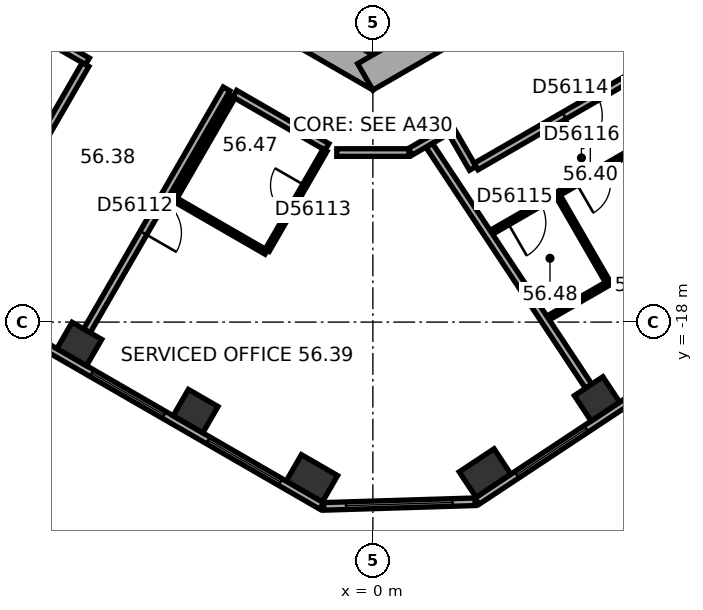
"""IFC4 building model, lengths in metres.
Left out: names, types, materials, properties, quantities, classifications, styles, units other than length and angle.
Written with IfcOpenShell. Run it as: python <this file> out.ifc"""

import sys

from ifc_helpers import new_model, si_unit, direction, frame, frame_2d, origin, origin_2d, place, context, subcontext, project, spatial, rectangle, extrude, element, fill, save


model = new_model("IFC4")
c1 = context("Model", 3, precision=1e-05, world=origin(), true_north=direction((0.0, 1.0)))
c2 = subcontext(c1, "Body", "Model", "MODEL_VIEW")
j1 = project(units=[si_unit("LENGTHUNIT", "METRE"), si_unit("PLANEANGLEUNIT", "RADIAN")], contexts=[c1])
p1 = place(None, origin())
s1 = spatial("IfcSite", under=j1, at=p1, CompositionType="ELEMENT")
p2 = place(p1, origin())
s2 = spatial("IfcBuilding", under=s1, at=p2, CompositionType="ELEMENT")
p3 = place(p2, frame((0.0, 0.0, 229.1)))
s3 = spatial("IfcBuildingStorey", under=s2, at=p3, CompositionType="ELEMENT", Elevation=229.1)
for number, where, z_axis, x_axis in (
    (1, (-7.725, -18.576, 0.0), (0.0, 0.0, 1.0), (0.866, -0.5, 0.0)),
    (2, (-4.665, -20.343, 0.0), (0.0, 0.0, 1.0), (0.866, -0.5, 0.0)),
):
    element("IfcColumn", number, at=place(p3, frame(where, z_axis=z_axis, x_axis=x_axis)), inside=s3, PredefinedType="COLUMN", context=c2, shape_type="SweptSolid", body=[
        extrude(rectangle(XDim=0.9, YDim=0.8, at=origin_2d()), origin(), (0.0, 0.0, 1.0), 3.7),
    ])
for number, where, z_axis, x_axis in (
    (3, (-1.604, -22.11, 0.0), (0.0, 0.0, 1.0), (0.866, -0.5, 0.0)),
    (4, (2.951, -21.971, 0.0), (0.0, 0.0, 1.0), (0.834, 0.552, 0.0)),
):
    element("IfcColumn", number, at=place(p3, frame(where, z_axis=z_axis, x_axis=x_axis)), inside=s3, PredefinedType="COLUMN", context=c2, shape_type="SweptSolid", body=[
        extrude(rectangle(XDim=1.1, YDim=0.8, at=origin_2d()), origin(), (0.0, 0.0, 1.0), 3.7),
    ])
p4 = place(p3, frame((5.898, -20.021, 0.0), z_axis=(0.0, 0.0, 1.0), x_axis=(0.833885822067, 0.551936985312, 0.0)))
e5 = element("IfcColumn", 5, at=p4, inside=s3, PredefinedType="COLUMN", context=c2, shape_type="SweptSolid", body=[
    extrude(rectangle(XDim=0.9, YDim=0.8, at=origin_2d()), origin(), (0.0, 0.0, 1.0), 3.7),
])
p5 = place(p3, frame((-10.1, -5.6, 0.0), z_axis=(0.0, 0.0, 1.0), x_axis=(0.866023897231, -0.500002609418, 0.0)))
e6 = element("IfcWall", 6, at=p5, inside=s3, PredefinedType="SHEAR", context=c2, shape_type="SweptSolid", body=[
    extrude(rectangle(XDim=11.894, YDim=0.8, at=frame_2d((5.947, 0.0))), origin(), (0.0, 0.0, 1.0), 3.7),
])
p6 = place(p5, frame((6.147, 0.0, 0.0)))
e7 = element("IfcOpeningElement", 7, at=p6, cuts=e6, PredefinedType="OPENING", context=c2, shape_type="SweptSolid", body=[
    extrude(rectangle(XDim=1.5, YDim=2.1, at=frame_2d((0.75, 1.05))), frame((0.0, 0.41, 0.0), z_axis=(0.0, -1.0, 0.0), x_axis=(1.0, 0.0, 0.0)), (0.0, 0.0, 1.0), 0.82),
])
p7 = place(p5, frame((1.597, 0.0, 0.0)))
e8 = element("IfcOpeningElement", 8, at=p7, cuts=e6, PredefinedType="OPENING", context=c2, shape_type="SweptSolid", body=[
    extrude(rectangle(XDim=1.1, YDim=2.1, at=frame_2d((0.55, 1.05))), frame((0.0, 0.41, 0.0), z_axis=(0.0, -1.0, 0.0), x_axis=(1.0, 0.0, 0.0)), (0.0, 0.0, 1.0), 0.82),
])
p8 = place(p5, frame((4.197, 0.0, 0.0)))
e9 = element("IfcOpeningElement", 9, at=p8, cuts=e6, PredefinedType="OPENING", context=c2, shape_type="SweptSolid", body=[
    extrude(rectangle(XDim=1.1, YDim=2.1, at=frame_2d((0.55, 1.05))), frame((0.0, 0.41, 0.0), z_axis=(0.0, -1.0, 0.0), x_axis=(1.0, 0.0, 0.0)), (0.0, 0.0, 1.0), 0.82),
])
p9 = place(p3, frame((-0.2, -11.547, 0.0), z_axis=(0.0, 0.0, 1.0), x_axis=(0.866023897231, 0.500002609418, 0.0)))
e10 = element("IfcWall", 10, at=p9, inside=s3, PredefinedType="SHEAR", context=c2, shape_type="SweptSolid", body=[
    extrude(rectangle(XDim=11.894, YDim=0.8, at=frame_2d((5.947, 0.0))), origin(), (0.0, 0.0, 1.0), 3.7),
])
p10 = place(p9, frame((2.497, 0.0, 0.0)))
e11 = element("IfcOpeningElement", 11, at=p10, cuts=e10, PredefinedType="OPENING", context=c2, shape_type="SweptSolid", body=[
    extrude(rectangle(XDim=1.1, YDim=2.1, at=frame_2d((0.55, 1.05))), frame((0.0, 0.41, 0.0), z_axis=(0.0, -1.0, 0.0), x_axis=(1.0, 0.0, 0.0)), (0.0, 0.0, 1.0), 0.82),
])
p11 = place(p9, frame((5.097, 0.0, 0.0)))
e12 = element("IfcOpeningElement", 12, at=p11, cuts=e10, PredefinedType="OPENING", context=c2, shape_type="SweptSolid", body=[
    extrude(rectangle(XDim=1.1, YDim=2.1, at=frame_2d((0.55, 1.05))), frame((0.0, 0.41, 0.0), z_axis=(0.0, -1.0, 0.0), x_axis=(1.0, 0.0, 0.0)), (0.0, 0.0, 1.0), 0.82),
])
p12 = place(p9, frame((7.697, 0.0, 0.0)))
e13 = element("IfcOpeningElement", 13, at=p12, cuts=e10, PredefinedType="OPENING", context=c2, shape_type="SweptSolid", body=[
    extrude(rectangle(XDim=1.1, YDim=2.1, at=frame_2d((0.55, 1.05))), frame((0.0, 0.41, 0.0), z_axis=(0.0, -1.0, 0.0), x_axis=(1.0, 0.0, 0.0)), (0.0, 0.0, 1.0), 0.82),
])
p13 = place(p3, frame((-17.664, -13.415, 0.0), z_axis=(0.0, 0.0, 1.0), x_axis=(0.866026555358, -0.49999800541, 0.0)))
e14 = element("IfcWall", 14, at=p13, inside=s3, PredefinedType="STANDARD", context=c2, shape_type="SweptSolid", body=[
    extrude(rectangle(XDim=18.841, YDim=0.2, at=frame_2d((9.421, 0.0))), origin(), (0.0, 0.0, 1.0), 3.7),
])
p14 = place(p13, frame((1.254, 0.0, 0.9)))
e15 = element("IfcOpeningElement", 15, at=p14, cuts=e14, PredefinedType="OPENING", context=c2, shape_type="SweptSolid", body=[
    extrude(rectangle(XDim=2.2, YDim=2.0, at=frame_2d((1.1, 1.0))), frame((0.0, 0.11, 0.0), z_axis=(0.0, -1.0, 0.0), x_axis=(1.0, 0.0, 0.0)), (0.0, 0.0, 1.0), 0.22),
])
p15 = place(p13, frame((4.788, 0.0, 0.9)))
e16 = element("IfcOpeningElement", 16, at=p15, cuts=e14, PredefinedType="OPENING", context=c2, shape_type="SweptSolid", body=[
    extrude(rectangle(XDim=2.2, YDim=2.0, at=frame_2d((1.1, 1.0))), frame((0.0, 0.11, 0.0), z_axis=(0.0, -1.0, 0.0), x_axis=(1.0, 0.0, 0.0)), (0.0, 0.0, 1.0), 0.22),
])
p16 = place(p13, frame((8.322, 0.0, 0.9)))
e17 = element("IfcOpeningElement", 17, at=p16, cuts=e14, PredefinedType="OPENING", context=c2, shape_type="SweptSolid", body=[
    extrude(rectangle(XDim=2.2, YDim=2.0, at=frame_2d((1.1, 1.0))), frame((0.0, 0.11, 0.0), z_axis=(0.0, -1.0, 0.0), x_axis=(1.0, 0.0, 0.0)), (0.0, 0.0, 1.0), 0.22),
])
p17 = place(p13, frame((11.855, 0.0, 0.9)))
e18 = element("IfcOpeningElement", 18, at=p17, cuts=e14, PredefinedType="OPENING", context=c2, shape_type="SweptSolid", body=[
    extrude(rectangle(XDim=2.2, YDim=2.0, at=frame_2d((1.1, 1.0))), frame((0.0, 0.11, 0.0), z_axis=(0.0, -1.0, 0.0), x_axis=(1.0, 0.0, 0.0)), (0.0, 0.0, 1.0), 0.22),
])
p18 = place(p13, frame((15.389, 0.0, 0.9)))
e19 = element("IfcOpeningElement", 19, at=p18, cuts=e14, PredefinedType="OPENING", context=c2, shape_type="SweptSolid", body=[
    extrude(rectangle(XDim=2.2, YDim=2.0, at=frame_2d((1.1, 1.0))), frame((0.0, 0.11, 0.0), z_axis=(0.0, -1.0, 0.0), x_axis=(1.0, 0.0, 0.0)), (0.0, 0.0, 1.0), 0.22),
])
p19 = place(p3, frame((-1.294, -22.849, 0.0), z_axis=(0.0, 0.0, 1.0), x_axis=(0.999533952558, 0.030526671678, 0.0)))
e20 = element("IfcWall", 20, at=p19, inside=s3, PredefinedType="STANDARD", context=c2, shape_type="SweptSolid", body=[
    extrude(rectangle(XDim=3.983, YDim=0.2, at=frame_2d((1.991, 0.0))), origin(), (0.0, 0.0, 1.0), 3.7),
])
p20 = place(p19, frame((0.591, 0.0, 0.9)))
e21 = element("IfcOpeningElement", 21, at=p20, cuts=e20, PredefinedType="OPENING", context=c2, shape_type="SweptSolid", body=[
    extrude(rectangle(XDim=2.8, YDim=2.0, at=frame_2d((1.4, 1.0))), frame((0.0, 0.11, 0.0), z_axis=(0.0, -1.0, 0.0), x_axis=(1.0, 0.0, 0.0)), (0.0, 0.0, 1.0), 0.22),
])
p21 = place(p3, frame((2.739, -22.711, 0.0), z_axis=(0.0, 0.0, 1.0), x_axis=(0.833885723098, 0.551937134838, 0.0)))
e22 = element("IfcWall", 22, at=p21, inside=s3, PredefinedType="STANDARD", context=c2, shape_type="SweptSolid", body=[
    extrude(rectangle(XDim=18.841, YDim=0.2, at=frame_2d((9.421, 0.0))), origin(), (0.0, 0.0, 1.0), 3.7),
])
p22 = place(p21, frame((1.252, 0.0, 0.9)))
e23 = element("IfcOpeningElement", 23, at=p22, cuts=e22, PredefinedType="OPENING", context=c2, shape_type="SweptSolid", body=[
    extrude(rectangle(XDim=2.2, YDim=2.0, at=frame_2d((1.1, 1.0))), frame((0.0, 0.11, 0.0), z_axis=(0.0, -1.0, 0.0), x_axis=(1.0, 0.0, 0.0)), (0.0, 0.0, 1.0), 0.22),
])
p23 = place(p21, frame((4.786, 0.0, 0.9)))
e24 = element("IfcOpeningElement", 24, at=p23, cuts=e22, PredefinedType="OPENING", context=c2, shape_type="SweptSolid", body=[
    extrude(rectangle(XDim=2.2, YDim=2.0, at=frame_2d((1.1, 1.0))), frame((0.0, 0.11, 0.0), z_axis=(0.0, -1.0, 0.0), x_axis=(1.0, 0.0, 0.0)), (0.0, 0.0, 1.0), 0.22),
])
p24 = place(p21, frame((8.32, 0.0, 0.9)))
e25 = element("IfcOpeningElement", 25, at=p24, cuts=e22, PredefinedType="OPENING", context=c2, shape_type="SweptSolid", body=[
    extrude(rectangle(XDim=2.2, YDim=2.0, at=frame_2d((1.1, 1.0))), frame((0.0, 0.11, 0.0), z_axis=(0.0, -1.0, 0.0), x_axis=(1.0, 0.0, 0.0)), (0.0, 0.0, 1.0), 0.22),
])
p25 = place(p21, frame((11.854, 0.0, 0.9)))
e26 = element("IfcOpeningElement", 26, at=p25, cuts=e22, PredefinedType="OPENING", context=c2, shape_type="SweptSolid", body=[
    extrude(rectangle(XDim=2.2, YDim=2.0, at=frame_2d((1.1, 1.0))), frame((0.0, 0.11, 0.0), z_axis=(0.0, -1.0, 0.0), x_axis=(1.0, 0.0, 0.0)), (0.0, 0.0, 1.0), 0.22),
])
p26 = place(p21, frame((15.387, 0.0, 0.9)))
e27 = element("IfcOpeningElement", 27, at=p26, cuts=e22, PredefinedType="OPENING", context=c2, shape_type="SweptSolid", body=[
    extrude(rectangle(XDim=2.2, YDim=2.0, at=frame_2d((1.1, 1.0))), frame((0.0, 0.11, 0.0), z_axis=(0.0, -1.0, 0.0), x_axis=(1.0, 0.0, 0.0)), (0.0, 0.0, 1.0), 0.22),
])
p27 = place(p3, frame((-11.551, -8.805, 0.0), z_axis=(0.0, 0.0, 1.0), x_axis=(0.866038310922, -0.499977643516, 0.0)))
e28 = element("IfcWall", 28, at=p27, inside=s3, PredefinedType="PARTITIONING", context=c2, shape_type="SweptSolid", body=[
    extrude(rectangle(XDim=4.665, YDim=0.2, at=frame_2d((2.333, 0.0))), origin(), (0.0, 0.0, 1.0), 3.42),
])
p28 = place(p3, frame((-10.585, -16.463, 0.0), z_axis=(0.0, 0.0, 1.0), x_axis=(0.499993802756, 0.866028981735, 0.0)))
e29 = element("IfcWall", 29, at=p28, inside=s3, PredefinedType="PARTITIONING", context=c2, shape_type="SweptSolid", body=[
    extrude(rectangle(XDim=6.049, YDim=0.2, at=frame_2d((3.024, 0.0))), origin(), (0.0, 0.0, 1.0), 2.87),
])
p29 = place(p28, frame((2.524, 0.0, 0.0)))
e30 = element("IfcOpeningElement", 30, at=p29, cuts=e29, PredefinedType="OPENING", context=c2, shape_type="SweptSolid", body=[
    extrude(rectangle(XDim=1.0, YDim=2.1, at=frame_2d((0.5, 1.05))), frame((0.0, 0.11, 0.0), z_axis=(0.0, -1.0, 0.0), x_axis=(1.0, 0.0, 0.0)), (0.0, 0.0, 1.0), 0.22),
])
p30 = place(p3, frame((-7.525, -18.23, 0.0), z_axis=(0.0, 0.0, 1.0), x_axis=(0.499983153418, 0.866035129944, 0.0)))
e31 = element("IfcWall", 31, at=p30, inside=s3, PredefinedType="PARTITIONING", context=c2, shape_type="SweptSolid", body=[
    extrude(rectangle(XDim=7.35, YDim=0.2, at=frame_2d((3.675, 0.0))), origin(), (0.0, 0.0, 1.0), 3.42),
])
p31 = place(p30, frame((2.975, 0.0, 0.0)))
e32 = element("IfcOpeningElement", 32, at=p31, cuts=e31, PredefinedType="OPENING", context=c2, shape_type="SweptSolid", body=[
    extrude(rectangle(XDim=1.0, YDim=2.1, at=frame_2d((0.5, 1.05))), frame((0.0, 0.11, 0.0), z_axis=(0.0, -1.0, 0.0), x_axis=(1.0, 0.0, 0.0)), (0.0, 0.0, 1.0), 0.22),
])
p32 = place(p3, frame((-5.233, -14.761, 0.0), z_axis=(0.0, 0.0, 1.0), x_axis=(0.499967891604, 0.866043940782, 0.0)))
e33 = element("IfcWall", 33, at=p32, inside=s3, PredefinedType="PARTITIONING", context=c2, shape_type="SweptSolid", body=[
    extrude(rectangle(XDim=3.1, YDim=0.12, at=frame_2d((1.55, 0.0))), origin(), (0.0, 0.0, 1.0), 3.42),
])
p33 = place(p3, frame((-3.634, -11.99, 0.0), z_axis=(0.0, 0.0, 1.0), x_axis=(0.866018616679, -0.500011755427, 0.0)))
e34 = element("IfcWall", 34, at=p33, inside=s3, PredefinedType="PARTITIONING", context=c2, shape_type="SweptSolid", body=[
    extrude(rectangle(XDim=2.8, YDim=0.2, at=frame_2d((1.4, 0.0))), origin(), (0.0, 0.0, 1.0), 3.42),
])
p34 = place(p3, frame((-2.809, -16.161, 0.0), z_axis=(0.0, 0.0, 1.0), x_axis=(-0.865997131366, 0.500048966069, 0.0)))
e35 = element("IfcWall", 35, at=p34, inside=s3, PredefinedType="PARTITIONING", context=c2, shape_type="SweptSolid", body=[
    extrude(rectangle(XDim=2.74, YDim=0.12, at=frame_2d((1.37, 0.0))), origin(), (0.0, 0.0, 1.0), 3.42),
])
p35 = place(p3, frame((-1.259, -13.476, 0.0), z_axis=(0.0, 0.0, 1.0), x_axis=(-0.500026023896, -0.86601037836, 0.0)))
e36 = element("IfcWall", 36, at=p35, inside=s3, PredefinedType="PARTITIONING", context=c2, shape_type="SweptSolid", body=[
    extrude(rectangle(XDim=3.04, YDim=0.12, at=frame_2d((1.52, 0.0))), origin(), (0.0, 0.0, 1.0), 3.42),
])
p36 = place(p35, frame((1.07, 0.0, 0.0)))
e37 = element("IfcOpeningElement", 37, at=p36, cuts=e36, PredefinedType="OPENING", context=c2, shape_type="SweptSolid", body=[
    extrude(rectangle(XDim=0.9, YDim=2.1, at=frame_2d((0.45, 1.05))), frame((0.0, 0.07, 0.0), z_axis=(0.0, -1.0, 0.0), x_axis=(1.0, 0.0, 0.0)), (0.0, 0.0, 1.0), 0.14),
])
p37 = place(p3, frame((-0.95, -13.539, 0.0), z_axis=(0.0, 0.0, 1.0), x_axis=(1.0, 0.0, 0.0)))
e38 = element("IfcWall", 38, at=p37, inside=s3, PredefinedType="PARTITIONING", context=c2, shape_type="SweptSolid", body=[
    extrude(rectangle(XDim=1.9, YDim=0.2, at=frame_2d((0.95, 0.0))), origin(), (0.0, 0.0, 1.0), 3.42),
])
p38 = place(p3, frame((0.985, -13.519, 0.0), z_axis=(0.0, 0.0, 1.0), x_axis=(0.866054082991, 0.499950322867, 0.0)))
e39 = element("IfcWall", 39, at=p38, inside=s3, PredefinedType="PARTITIONING", context=c2, shape_type="SweptSolid", body=[
    extrude(rectangle(XDim=1.206, YDim=0.2, at=frame_2d((0.603, 0.0))), origin(), (0.0, 0.0, 1.0), 3.42),
])
p39 = place(p3, frame((2.079, -13.003, 0.0), z_axis=(0.0, 0.0, 1.0), x_axis=(0.500074377092, -0.865982457891, 0.0)))
e40 = element("IfcWall", 40, at=p39, inside=s3, PredefinedType="PARTITIONING", context=c2, shape_type="SweptSolid", body=[
    extrude(rectangle(XDim=1.101, YDim=0.2, at=frame_2d((0.55, 0.0))), origin(), (0.0, 0.0, 1.0), 3.42),
])
p40 = place(p3, frame((2.716, -13.906, 0.0), z_axis=(0.0, 0.0, 1.0), x_axis=(0.866040290674, 0.499974214264, 0.0)))
e41 = element("IfcWall", 41, at=p40, inside=s3, PredefinedType="PARTITIONING", context=c2, shape_type="SweptSolid", body=[
    extrude(rectangle(XDim=8.702, YDim=0.2, at=frame_2d((4.351, 0.0))), origin(), (0.0, 0.0, 1.0), 3.42),
])
p41 = place(p40, frame((2.679, 0.0, 0.0)))
e42 = element("IfcOpeningElement", 42, at=p41, cuts=e41, PredefinedType="OPENING", context=c2, shape_type="SweptSolid", body=[
    extrude(rectangle(XDim=1.0, YDim=2.1, at=frame_2d((0.5, 1.05))), frame((0.0, 0.11, 0.0), z_axis=(0.0, -1.0, 0.0), x_axis=(1.0, 0.0, 0.0)), (0.0, 0.0, 1.0), 0.22),
])
p42 = place(p3, frame((3.117, -15.638, 0.0), z_axis=(0.0, 0.0, 1.0), x_axis=(0.866031365477, 0.499989673903, 0.0)))
e43 = element("IfcWall", 43, at=p42, inside=s3, PredefinedType="PARTITIONING", context=c2, shape_type="SweptSolid", body=[
    extrude(rectangle(XDim=6.881, YDim=0.12, at=frame_2d((3.44, 0.0))), origin(), (0.0, 0.0, 1.0), 3.42),
])
p43 = place(p42, frame((0.5, 0.0, 0.0)))
e44 = element("IfcOpeningElement", 44, at=p43, cuts=e43, PredefinedType="OPENING", context=c2, shape_type="SweptSolid", body=[
    extrude(rectangle(XDim=1.0, YDim=2.1, at=frame_2d((0.5, 1.05))), frame((0.0, 0.07, 0.0), z_axis=(0.0, -1.0, 0.0), x_axis=(1.0, 0.0, 0.0)), (0.0, 0.0, 1.0), 0.14),
])
p44 = place(p42, frame((2.583, 0.0, 0.0)))
e45 = element("IfcOpeningElement", 45, at=p44, cuts=e43, PredefinedType="OPENING", context=c2, shape_type="SweptSolid", body=[
    extrude(rectangle(XDim=0.9, YDim=2.1, at=frame_2d((0.45, 1.05))), frame((0.0, 0.07, 0.0), z_axis=(0.0, -1.0, 0.0), x_axis=(1.0, 0.0, 0.0)), (0.0, 0.0, 1.0), 0.14),
])
p45 = place(p42, frame((5.023, 0.0, 0.0)))
e46 = element("IfcOpeningElement", 46, at=p45, cuts=e43, PredefinedType="OPENING", context=c2, shape_type="SweptSolid", body=[
    extrude(rectangle(XDim=0.9, YDim=2.1, at=frame_2d((0.45, 1.05))), frame((0.0, 0.07, 0.0), z_axis=(0.0, -1.0, 0.0), x_axis=(1.0, 0.0, 0.0)), (0.0, 0.0, 1.0), 0.14),
])
p46 = place(p3, frame((4.61, -17.893, 0.0), z_axis=(0.0, 0.0, 1.0), x_axis=(0.866023842607, 0.500002704028, 0.0)))
e47 = element("IfcWall", 47, at=p46, inside=s3, PredefinedType="PARTITIONING", context=c2, shape_type="SweptSolid", body=[
    extrude(rectangle(XDim=1.835, YDim=0.12, at=frame_2d((0.917, 0.0))), origin(), (0.0, 0.0, 1.0), 3.42),
])
p47 = place(p3, frame((5.677, -19.687, 0.0), z_axis=(0.0, 0.0, 1.0), x_axis=(-0.551936619203, 0.833886064389, 0.0)))
e48 = element("IfcWall", 48, at=p47, inside=s3, PredefinedType="PARTITIONING", context=c2, shape_type="SweptSolid", body=[
    extrude(rectangle(XDim=7.592, YDim=0.2, at=frame_2d((3.796, 0.0))), origin(), (0.0, 0.0, 1.0), 3.42),
])
p48 = place(p3, frame((6.169, -16.924, 0.0), z_axis=(0.0, 0.0, 1.0), x_axis=(-0.500047388771, 0.865998042136, 0.0)))
e49 = element("IfcWall", 49, at=p48, inside=s3, PredefinedType="PARTITIONING", context=c2, shape_type="SweptSolid", body=[
    extrude(rectangle(XDim=2.58, YDim=0.12, at=frame_2d((1.29, 0.0))), origin(), (0.0, 0.0, 1.0), 3.42),
])
p49 = place(p17, origin())
e50 = element("IfcWindow", 50, at=p49, inside=s3, PartitioningType="SINGLE_PANEL", PredefinedType="WINDOW", context=c2, shape_type="SweptSolid", body=[
    extrude(rectangle(XDim=2.2, YDim=2.0, at=frame_2d((1.1, 1.0))), frame((0.0, 0.03, 0.0), z_axis=(0.0, -1.0, 0.0), x_axis=(1.0, 0.0, 0.0)), (0.0, 0.0, 1.0), 0.06),
])
fill(e18, e50)
p50 = place(p18, origin())
e51 = element("IfcWindow", 51, at=p50, inside=s3, PartitioningType="SINGLE_PANEL", PredefinedType="WINDOW", context=c2, shape_type="SweptSolid", body=[
    extrude(rectangle(XDim=2.2, YDim=2.0, at=frame_2d((1.1, 1.0))), frame((0.0, 0.03, 0.0), z_axis=(0.0, -1.0, 0.0), x_axis=(1.0, 0.0, 0.0)), (0.0, 0.0, 1.0), 0.06),
])
fill(e19, e51)
p51 = place(p20, origin())
e52 = element("IfcWindow", 52, at=p51, inside=s3, PartitioningType="SINGLE_PANEL", PredefinedType="WINDOW", context=c2, shape_type="SweptSolid", body=[
    extrude(rectangle(XDim=2.8, YDim=2.0, at=frame_2d((1.4, 1.0))), frame((0.0, 0.03, 0.0), z_axis=(0.0, -1.0, 0.0), x_axis=(1.0, 0.0, 0.0)), (0.0, 0.0, 1.0), 0.06),
])
fill(e21, e52)
p52 = place(p22, origin())
e53 = element("IfcWindow", 53, at=p52, inside=s3, PartitioningType="SINGLE_PANEL", PredefinedType="WINDOW", context=c2, shape_type="SweptSolid", body=[
    extrude(rectangle(XDim=2.2, YDim=2.0, at=frame_2d((1.1, 1.0))), frame((0.0, 0.03, 0.0), z_axis=(0.0, -1.0, 0.0), x_axis=(1.0, 0.0, 0.0)), (0.0, 0.0, 1.0), 0.06),
])
fill(e23, e53)
p53 = place(p31, origin())
e54 = element("IfcDoor", 54, at=p53, inside=s3, OperationType="SINGLE_SWING_LEFT", PredefinedType="DOOR", context=c2, shape_type="SweptSolid", body=[
    extrude(rectangle(XDim=1.0, YDim=2.1, at=frame_2d((0.5, 1.05))), frame((0.0, 0.025, 0.0), z_axis=(0.0, -1.0, 0.0), x_axis=(1.0, 0.0, 0.0)), (0.0, 0.0, 1.0), 0.05),
])
fill(e32, e54)
p54 = place(p36, origin())
e55 = element("IfcDoor", 55, at=p54, inside=s3, OperationType="SINGLE_SWING_LEFT", PredefinedType="DOOR", context=c2, shape_type="SweptSolid", body=[
    extrude(rectangle(XDim=0.9, YDim=2.1, at=frame_2d((0.45, 1.05))), frame((0.0, 0.025, 0.0), z_axis=(0.0, -1.0, 0.0), x_axis=(1.0, 0.0, 0.0)), (0.0, 0.0, 1.0), 0.05),
])
fill(e37, e55)
p55 = place(p41, origin())
e56 = element("IfcDoor", 56, at=p55, inside=s3, OperationType="SINGLE_SWING_LEFT", PredefinedType="DOOR", context=c2, shape_type="SweptSolid", body=[
    extrude(rectangle(XDim=1.0, YDim=2.1, at=frame_2d((0.5, 1.05))), frame((0.0, 0.025, 0.0), z_axis=(0.0, -1.0, 0.0), x_axis=(1.0, 0.0, 0.0)), (0.0, 0.0, 1.0), 0.05),
])
fill(e42, e56)
p56 = place(p43, origin())
e57 = element("IfcDoor", 57, at=p56, inside=s3, OperationType="SINGLE_SWING_LEFT", PredefinedType="DOOR", context=c2, shape_type="SweptSolid", body=[
    extrude(rectangle(XDim=1.0, YDim=2.1, at=frame_2d((0.5, 1.05))), frame((0.0, 0.025, 0.0), z_axis=(0.0, -1.0, 0.0), x_axis=(1.0, 0.0, 0.0)), (0.0, 0.0, 1.0), 0.05),
])
fill(e44, e57)
p57 = place(p44, origin())
e58 = element("IfcDoor", 58, at=p57, inside=s3, OperationType="SINGLE_SWING_LEFT", PredefinedType="DOOR", context=c2, shape_type="SweptSolid", body=[
    extrude(rectangle(XDim=0.9, YDim=2.1, at=frame_2d((0.45, 1.05))), frame((0.0, 0.025, 0.0), z_axis=(0.0, -1.0, 0.0), x_axis=(1.0, 0.0, 0.0)), (0.0, 0.0, 1.0), 0.05),
])
fill(e45, e58)
save(model, sys.argv[1])
